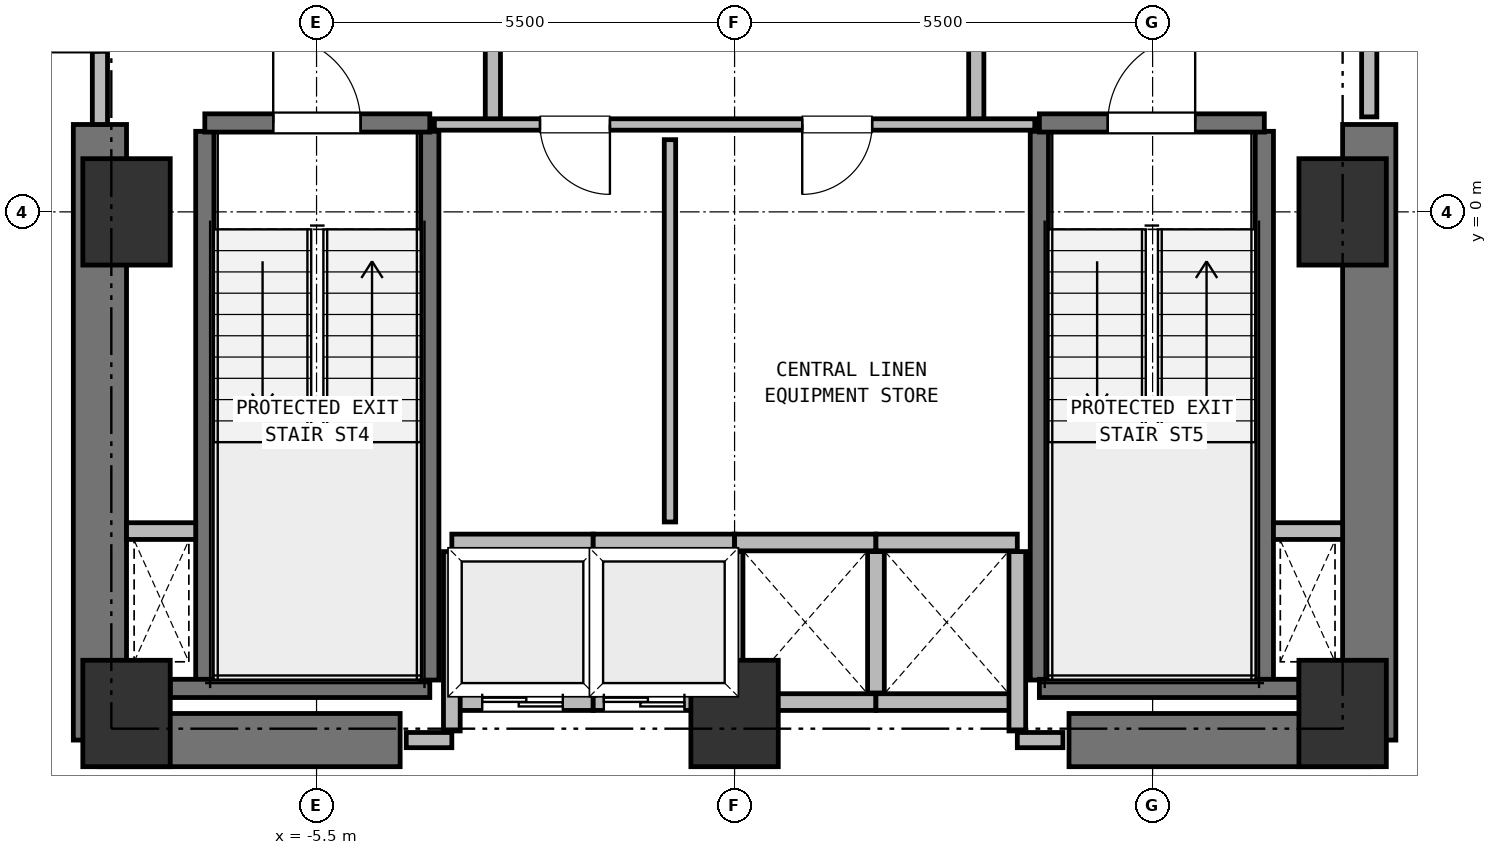
"""IFC4 building model, lengths in metres.
Left out: names, types, materials, properties, quantities, classifications, styles, units other than length and angle.
Written with IfcOpenShell. Run it as: python <this file> out.ifc"""

import sys

from ifc_helpers import new_model, si_unit, direction, frame, frame_2d, origin, origin_2d, place, context, subcontext, project, spatial, rectangle, extrude, element, fill, save


model = new_model("IFC4")
c1 = context("Model", 3, precision=1e-05, world=origin(), true_north=direction((0.0, 1.0)))
c2 = subcontext(c1, "Body", "Model", "MODEL_VIEW")
j1 = project(units=[si_unit("LENGTHUNIT", "METRE"), si_unit("PLANEANGLEUNIT", "RADIAN")], contexts=[c1])
p1 = place(None, origin())
s1 = spatial("IfcSite", under=j1, at=p1, CompositionType="ELEMENT")
p2 = place(p1, origin())
s2 = spatial("IfcBuilding", under=s1, at=p2, CompositionType="ELEMENT")
p3 = place(p2, frame((0.0, 0.0, 30.5)))
s3 = spatial("IfcBuildingStorey", under=s2, at=p3, CompositionType="ELEMENT", Elevation=30.5)
for number, where, z_axis, x_axis in (
    (1, (-8.0, -6.6, 0.0), (0.0, 0.0, 1.0), (1.0, 0.0, 0.0)),
    (2, (0.0, -6.6, 0.0), (0.0, 0.0, 1.0), (1.0, 0.0, 0.0)),
    (3, (8.0, -6.6, 0.0), (0.0, 0.0, 1.0), (1.0, 0.0, 0.0)),
    (4, (8.0, 0.0, 0.0), (0.0, 0.0, 1.0), (1.0, 0.0, 0.0)),
    (5, (-8.0, 0.0, 0.0), (0.0, 0.0, 1.0), (1.0, 0.0, 0.0)),
):
    element("IfcColumn", number, at=place(p3, frame(where, z_axis=z_axis, x_axis=x_axis)), inside=s3, PredefinedType="COLUMN", context=c2, shape_type="SweptSolid", body=[
        extrude(rectangle(XDim=1.15, YDim=1.4, at=origin_2d()), origin(), (0.0, 0.0, 1.0), 3.75),
    ])
for number, where, z_axis, x_axis in (
    (6, (-8.35, -6.95, 0.0), (0.0, 0.0, 1.0), (1.0, 0.0, 0.0)),
    (7, (4.4, -6.95, 0.0), (0.0, 0.0, 1.0), (1.0, 0.0, 0.0)),
):
    element("IfcWall", number, at=place(p3, frame(where, z_axis=z_axis, x_axis=x_axis)), inside=s3, PredefinedType="SHEAR", context=c2, shape_type="SweptSolid", body=[
        extrude(rectangle(XDim=3.95, YDim=0.7, at=frame_2d((1.975, 0.0))), origin(), (0.0, 0.0, 1.0), 3.5),
    ])
for number, where, z_axis, x_axis in (
    (8, (-8.35, -6.95, 0.0), (0.0, 0.0, 1.0), (0.0, 1.0, 0.0)),
    (9, (8.35, -6.95, 0.0), (0.0, 0.0, 1.0), (0.0, 1.0, 0.0)),
):
    element("IfcWall", number, at=place(p3, frame(where, z_axis=z_axis, x_axis=x_axis)), inside=s3, PredefinedType="SHEAR", context=c2, shape_type="SweptSolid", body=[
        extrude(rectangle(XDim=8.1, YDim=0.7, at=frame_2d((4.05, 0.0))), origin(), (0.0, 0.0, 1.0), 3.5),
    ])
p4 = place(p3, frame((-6.97, -6.16, 0.0), z_axis=(0.0, 0.0, 1.0), x_axis=(0.0, 1.0, 0.0)))
e10 = element("IfcWall", 10, at=p4, inside=s3, PredefinedType="SHEAR", context=c2, shape_type="SweptSolid", body=[
    extrude(rectangle(XDim=7.22, YDim=0.24, at=frame_2d((3.61, 0.0))), origin(), (0.0, 0.0, 1.0), 3.5),
])
p5 = place(p3, frame((-7.425, -6.27, 0.0), z_axis=(0.0, 0.0, 1.0), x_axis=(1.0, 0.0, 0.0)))
e11 = element("IfcWall", 11, at=p5, inside=s3, PredefinedType="SHEAR", context=c2, shape_type="SweptSolid", body=[
    extrude(rectangle(XDim=3.415, YDim=0.24, at=frame_2d((1.708, 0.0))), origin(), (0.0, 0.0, 1.0), 3.5),
])
p6 = place(p3, frame((-4.01, -6.16, 0.0), z_axis=(0.0, 0.0, 1.0), x_axis=(0.0, 1.0, 0.0)))
e12 = element("IfcWall", 12, at=p6, inside=s3, PredefinedType="SHEAR", context=c2, shape_type="SweptSolid", body=[
    extrude(rectangle(XDim=7.22, YDim=0.24, at=frame_2d((3.61, 0.0))), origin(), (0.0, 0.0, 1.0), 3.5),
])
p7 = place(p3, frame((-6.97, 1.17, 0.0), z_axis=(0.0, 0.0, 1.0), x_axis=(1.0, 0.0, 0.0)))
e13 = element("IfcWall", 13, at=p7, inside=s3, PredefinedType="SHEAR", context=c2, shape_type="SweptSolid", body=[
    extrude(rectangle(XDim=2.96, YDim=0.24, at=frame_2d((1.48, 0.0))), origin(), (0.0, 0.0, 1.0), 3.5),
])
p8 = place(p7, frame((0.9, 0.0, 0.0)))
e14 = element("IfcOpeningElement", 14, at=p8, cuts=e13, PredefinedType="OPENING", context=c2, shape_type="SweptSolid", body=[
    extrude(rectangle(XDim=1.15, YDim=2.15, at=frame_2d((0.575, 1.075))), frame((0.0, 0.13, 0.0), z_axis=(0.0, -1.0, 0.0), x_axis=(1.0, 0.0, 0.0)), (0.0, 0.0, 1.0), 0.26),
])
for number, where, z_axis, x_axis in (
    (15, (4.01, -6.16, 0.0), (0.0, 0.0, 1.0), (0.0, 1.0, 0.0)),
    (16, (6.97, -6.16, 0.0), (0.0, 0.0, 1.0), (0.0, 1.0, 0.0)),
):
    element("IfcWall", number, at=place(p3, frame(where, z_axis=z_axis, x_axis=x_axis)), inside=s3, PredefinedType="SHEAR", context=c2, shape_type="SweptSolid", body=[
        extrude(rectangle(XDim=7.22, YDim=0.24, at=frame_2d((3.61, 0.0))), origin(), (0.0, 0.0, 1.0), 3.5),
    ])
p9 = place(p3, frame((4.01, -6.27, 0.0), z_axis=(0.0, 0.0, 1.0), x_axis=(1.0, 0.0, 0.0)))
e17 = element("IfcWall", 17, at=p9, inside=s3, PredefinedType="SHEAR", context=c2, shape_type="SweptSolid", body=[
    extrude(rectangle(XDim=3.415, YDim=0.24, at=frame_2d((1.708, 0.0))), origin(), (0.0, 0.0, 1.0), 3.5),
])
p10 = place(p3, frame((4.01, 1.17, 0.0), z_axis=(0.0, 0.0, 1.0), x_axis=(1.0, 0.0, 0.0)))
e18 = element("IfcWall", 18, at=p10, inside=s3, PredefinedType="SHEAR", context=c2, shape_type="SweptSolid", body=[
    extrude(rectangle(XDim=2.96, YDim=0.24, at=frame_2d((1.48, 0.0))), origin(), (0.0, 0.0, 1.0), 3.5),
])
p11 = place(p10, frame((0.9, 0.0, 0.0)))
e19 = element("IfcOpeningElement", 19, at=p11, cuts=e18, PredefinedType="OPENING", context=c2, shape_type="SweptSolid", body=[
    extrude(rectangle(XDim=1.15, YDim=2.15, at=frame_2d((0.575, 1.075))), frame((0.0, 0.13, 0.0), z_axis=(0.0, -1.0, 0.0), x_axis=(1.0, 0.0, 0.0)), (0.0, 0.0, 1.0), 0.26),
])
for number, where, z_axis, x_axis in (
    (20, (-8.0, -4.2, 0.0), (0.0, 0.0, 1.0), (1.0, 0.0, 0.0)),
    (21, (7.09, -4.2, 0.0), (0.0, 0.0, 1.0), (1.0, 0.0, 0.0)),
):
    element("IfcWall", number, at=place(p3, frame(where, z_axis=z_axis, x_axis=x_axis)), inside=s3, PredefinedType="PARTITIONING", context=c2, shape_type="SweptSolid", body=[
        extrude(rectangle(XDim=0.91, YDim=0.22, at=frame_2d((0.455, 0.0))), origin(), (0.0, 0.0, 1.0), 3.5),
    ])
p12 = place(p3, frame((-3.72, -6.45, 0.0), z_axis=(0.0, 0.0, 1.0), x_axis=(1.0, 0.0, 0.0)))
e22 = element("IfcWall", 22, at=p12, inside=s3, PredefinedType="PARTITIONING", context=c2, shape_type="SweptSolid", body=[
    extrude(rectangle(XDim=1.86, YDim=0.22, at=frame_2d((0.93, 0.0))), origin(), (0.0, 0.0, 1.0), 3.08),
])
p13 = place(p12, frame((0.4, 0.0, 0.0)))
e23 = element("IfcOpeningElement", 23, at=p13, cuts=e22, PredefinedType="OPENING", context=c2, shape_type="SweptSolid", body=[
    extrude(rectangle(XDim=1.06, YDim=2.15, at=frame_2d((0.53, 1.075))), frame((0.0, 0.12, 0.0), z_axis=(0.0, -1.0, 0.0), x_axis=(1.0, 0.0, 0.0)), (0.0, 0.0, 1.0), 0.24),
])
p14 = place(p3, frame((-3.72, -4.35, 0.0), z_axis=(0.0, 0.0, 1.0), x_axis=(1.0, 0.0, 0.0)))
e24 = element("IfcWall", 24, at=p14, inside=s3, PredefinedType="PARTITIONING", context=c2, shape_type="SweptSolid", body=[
    extrude(rectangle(XDim=1.86, YDim=0.22, at=frame_2d((0.93, 0.0))), origin(), (0.0, 0.0, 1.0), 3.5),
])
p15 = place(p3, frame((-3.72, -6.83, 0.0), z_axis=(0.0, 0.0, 1.0), x_axis=(0.0, 1.0, 0.0)))
e25 = element("IfcWall", 25, at=p15, inside=s3, PredefinedType="PARTITIONING", context=c2, shape_type="SweptSolid", body=[
    extrude(rectangle(XDim=2.36, YDim=0.22, at=frame_2d((1.18, 0.0))), origin(), (0.0, 0.0, 1.0), 3.5),
])
p16 = place(p3, frame((-1.86, -6.33, 0.0), z_axis=(0.0, 0.0, 1.0), x_axis=(0.0, 1.0, 0.0)))
e26 = element("IfcWall", 26, at=p16, inside=s3, PredefinedType="PARTITIONING", context=c2, shape_type="SweptSolid", body=[
    extrude(rectangle(XDim=1.86, YDim=0.22, at=frame_2d((0.93, 0.0))), origin(), (0.0, 0.0, 1.0), 3.5),
])
p17 = place(p3, frame((-1.86, -6.45, 0.0), z_axis=(0.0, 0.0, 1.0), x_axis=(1.0, 0.0, 0.0)))
e27 = element("IfcWall", 27, at=p17, inside=s3, PredefinedType="PARTITIONING", context=c2, shape_type="SweptSolid", body=[
    extrude(rectangle(XDim=1.86, YDim=0.22, at=frame_2d((0.93, 0.0))), origin(), (0.0, 0.0, 1.0), 3.08),
])
p18 = place(p17, frame((0.14, 0.0, 0.0)))
e28 = element("IfcOpeningElement", 28, at=p18, cuts=e27, PredefinedType="OPENING", context=c2, shape_type="SweptSolid", body=[
    extrude(rectangle(XDim=1.06, YDim=2.15, at=frame_2d((0.53, 1.075))), frame((0.0, 0.12, 0.0), z_axis=(0.0, -1.0, 0.0), x_axis=(1.0, 0.0, 0.0)), (0.0, 0.0, 1.0), 0.24),
])
for number, where, z_axis, x_axis in (
    (29, (-1.86, -4.35, 0.0), (0.0, 0.0, 1.0), (1.0, 0.0, 0.0)),
    (30, (0.0, -6.33, 0.0), (0.0, 0.0, 1.0), (0.0, 1.0, 0.0)),
):
    element("IfcWall", number, at=place(p3, frame(where, z_axis=z_axis, x_axis=x_axis)), inside=s3, PredefinedType="PARTITIONING", context=c2, shape_type="SweptSolid", body=[
        extrude(rectangle(XDim=1.86, YDim=0.22, at=frame_2d((0.93, 0.0))), origin(), (0.0, 0.0, 1.0), 3.5),
    ])
p19 = place(p3, frame((0.0, -6.45, 0.0), z_axis=(0.0, 0.0, 1.0), x_axis=(1.0, 0.0, 0.0)))
e31 = element("IfcWall", 31, at=p19, inside=s3, PredefinedType="PARTITIONING", context=c2, shape_type="SweptSolid", body=[
    extrude(rectangle(XDim=1.86, YDim=0.22, at=frame_2d((0.93, 0.0))), origin(), (0.0, 0.0, 1.0), 3.08),
])
for number, where, z_axis, x_axis in (
    (32, (0.0, -4.35, 0.0), (0.0, 0.0, 1.0), (1.0, 0.0, 0.0)),
    (33, (1.86, -6.33, 0.0), (0.0, 0.0, 1.0), (0.0, 1.0, 0.0)),
):
    element("IfcWall", number, at=place(p3, frame(where, z_axis=z_axis, x_axis=x_axis)), inside=s3, PredefinedType="PARTITIONING", context=c2, shape_type="SweptSolid", body=[
        extrude(rectangle(XDim=1.86, YDim=0.22, at=frame_2d((0.93, 0.0))), origin(), (0.0, 0.0, 1.0), 3.5),
    ])
p20 = place(p3, frame((1.86, -6.45, 0.0), z_axis=(0.0, 0.0, 1.0), x_axis=(1.0, 0.0, 0.0)))
e34 = element("IfcWall", 34, at=p20, inside=s3, PredefinedType="PARTITIONING", context=c2, shape_type="SweptSolid", body=[
    extrude(rectangle(XDim=1.86, YDim=0.22, at=frame_2d((0.93, 0.0))), origin(), (0.0, 0.0, 1.0), 3.08),
])
p21 = place(p3, frame((1.86, -4.35, 0.0), z_axis=(0.0, 0.0, 1.0), x_axis=(1.0, 0.0, 0.0)))
e35 = element("IfcWall", 35, at=p21, inside=s3, PredefinedType="PARTITIONING", context=c2, shape_type="SweptSolid", body=[
    extrude(rectangle(XDim=1.86, YDim=0.22, at=frame_2d((0.93, 0.0))), origin(), (0.0, 0.0, 1.0), 3.5),
])
p22 = place(p3, frame((3.72, -6.83, 0.0), z_axis=(0.0, 0.0, 1.0), x_axis=(0.0, 1.0, 0.0)))
e36 = element("IfcWall", 36, at=p22, inside=s3, PredefinedType="PARTITIONING", context=c2, shape_type="SweptSolid", body=[
    extrude(rectangle(XDim=2.36, YDim=0.22, at=frame_2d((1.18, 0.0))), origin(), (0.0, 0.0, 1.0), 3.5),
])
p23 = place(p3, frame((-3.18, 1.15, 0.0), z_axis=(0.0, 0.0, 1.0), x_axis=(0.0, 1.0, 0.0)))
e37 = element("IfcWall", 37, at=p23, inside=s3, PredefinedType="PARTITIONING", context=c2, shape_type="SweptSolid", body=[
    extrude(rectangle(XDim=3.3, YDim=0.2, at=frame_2d((1.65, 0.0))), origin(), (0.0, 0.0, 1.0), 3.5),
])
p24 = place(p23, frame((1.08, 0.0, 0.0)))
e38 = element("IfcOpeningElement", 38, at=p24, cuts=e37, PredefinedType="OPENING", context=c2, shape_type="SweptSolid", body=[
    extrude(rectangle(XDim=1.15, YDim=2.15, at=frame_2d((0.575, 1.075))), frame((0.0, 0.11, 0.0), z_axis=(0.0, -1.0, 0.0), x_axis=(1.0, 0.0, 0.0)), (0.0, 0.0, 1.0), 0.22),
])
p25 = place(p3, frame((3.18, 1.15, 0.0), z_axis=(0.0, 0.0, 1.0), x_axis=(0.0, 1.0, 0.0)))
e39 = element("IfcWall", 39, at=p25, inside=s3, PredefinedType="PARTITIONING", context=c2, shape_type="SweptSolid", body=[
    extrude(rectangle(XDim=3.3, YDim=0.2, at=frame_2d((1.65, 0.0))), origin(), (0.0, 0.0, 1.0), 3.5),
])
p26 = place(p25, frame((1.08, 0.0, 0.0)))
e40 = element("IfcOpeningElement", 40, at=p26, cuts=e39, PredefinedType="OPENING", context=c2, shape_type="SweptSolid", body=[
    extrude(rectangle(XDim=1.15, YDim=2.15, at=frame_2d((0.575, 1.075))), frame((0.0, 0.11, 0.0), z_axis=(0.0, -1.0, 0.0), x_axis=(1.0, 0.0, 0.0)), (0.0, 0.0, 1.0), 0.22),
])
p27 = place(p3, frame((-8.35, 1.15, 0.0), z_axis=(0.0, 0.0, 1.0), x_axis=(0.0, 1.0, 0.0)))
e41 = element("IfcWall", 41, at=p27, inside=s3, PredefinedType="PARTITIONING", context=c2, shape_type="SweptSolid", body=[
    extrude(rectangle(XDim=5.4, YDim=0.2, at=frame_2d((2.7, 0.0))), origin(), (0.0, 0.0, 1.0), 3.5),
])
p28 = place(p27, frame((0.95, 0.0, 0.0)))
e42 = element("IfcOpeningElement", 42, at=p28, cuts=e41, PredefinedType="OPENING", context=c2, shape_type="SweptSolid", body=[
    extrude(rectangle(XDim=1.15, YDim=2.15, at=frame_2d((0.575, 1.075))), frame((0.0, 0.11, 0.0), z_axis=(0.0, -1.0, 0.0), x_axis=(1.0, 0.0, 0.0)), (0.0, 0.0, 1.0), 0.22),
])
p29 = place(p3, frame((8.35, 1.25, 0.0), z_axis=(0.0, 0.0, 1.0), x_axis=(0.0, 1.0, 0.0)))
e43 = element("IfcWall", 43, at=p29, inside=s3, PredefinedType="PARTITIONING", context=c2, shape_type="SweptSolid", body=[
    extrude(rectangle(XDim=5.3, YDim=0.2, at=frame_2d((2.65, 0.0))), origin(), (0.0, 0.0, 1.0), 3.5),
])
p30 = place(p29, frame((0.95, 0.0, 0.0)))
e44 = element("IfcOpeningElement", 44, at=p30, cuts=e43, PredefinedType="OPENING", context=c2, shape_type="SweptSolid", body=[
    extrude(rectangle(XDim=1.15, YDim=2.15, at=frame_2d((0.575, 1.075))), frame((0.0, 0.11, 0.0), z_axis=(0.0, -1.0, 0.0), x_axis=(1.0, 0.0, 0.0)), (0.0, 0.0, 1.0), 0.22),
])
p31 = place(p3, frame((3.95, 1.15, 0.0), z_axis=(0.0, 0.0, 1.0), x_axis=(-1.0, 0.0, 0.0)))
e45 = element("IfcWall", 45, at=p31, inside=s3, PredefinedType="PARTITIONING", context=c2, shape_type="SweptSolid", body=[
    extrude(rectangle(XDim=7.9, YDim=0.15, at=frame_2d((3.95, 0.0))), origin(), (0.0, 0.0, 1.0), 3.5),
])
p32 = place(p31, frame((5.59, 0.0, 0.0)))
e46 = element("IfcOpeningElement", 46, at=p32, cuts=e45, PredefinedType="OPENING", context=c2, shape_type="SweptSolid", body=[
    extrude(rectangle(XDim=0.92, YDim=2.05, at=frame_2d((0.46, 1.025))), frame((0.0, 0.085, 0.0), z_axis=(0.0, -1.0, 0.0), x_axis=(1.0, 0.0, 0.0)), (0.0, 0.0, 1.0), 0.17),
])
p33 = place(p31, frame((2.14, 0.0, 0.0)))
e47 = element("IfcOpeningElement", 47, at=p33, cuts=e45, PredefinedType="OPENING", context=c2, shape_type="SweptSolid", body=[
    extrude(rectangle(XDim=0.92, YDim=2.05, at=frame_2d((0.46, 1.025))), frame((0.0, 0.085, 0.0), z_axis=(0.0, -1.0, 0.0), x_axis=(1.0, 0.0, 0.0)), (0.0, 0.0, 1.0), 0.17),
])
for number, where, z_axis, x_axis in (
    (48, (-4.32, -6.95, 0.0), (0.0, 0.0, 1.0), (1.0, 0.0, 0.0)),
    (49, (3.72, -6.95, 0.0), (0.0, 0.0, 1.0), (1.0, 0.0, 0.0)),
):
    element("IfcWall", number, at=place(p3, frame(where, z_axis=z_axis, x_axis=x_axis)), inside=s3, PredefinedType="PARTITIONING", context=c2, shape_type="SweptSolid", body=[
        extrude(rectangle(XDim=0.6, YDim=0.2, at=frame_2d((0.3, 0.0))), origin(), (0.0, 0.0, 1.0), 3.5),
    ])
p34 = place(p3, frame((-0.85, -4.08, 0.0), z_axis=(0.0, 0.0, 1.0), x_axis=(0.0, 1.0, 0.0)))
e50 = element("IfcWall", 50, at=p34, inside=s3, PredefinedType="PARTITIONING", context=c2, shape_type="SweptSolid", body=[
    extrude(rectangle(XDim=5.03, YDim=0.15, at=frame_2d((2.515, 0.0))), origin(), (0.0, 0.0, 1.0), 3.5),
])
p35 = place(p3, frame((10.752, -7.178, 0.0), z_axis=(0.0, 0.0, 1.0), x_axis=(-0.707067066127, -0.707146494016, 0.0)))
e51 = element("IfcWall", 51, at=p35, inside=s3, PredefinedType="PARTITIONING", context=c2, shape_type="SweptSolid", body=[
    extrude(rectangle(XDim=3.074, YDim=0.15, at=frame_2d((1.537, 0.0))), origin(), (0.0, 0.0, 1.0), 3.12),
])
p36 = place(p3, frame((-8.578, -9.352, 0.0), z_axis=(0.0, 0.0, 1.0), x_axis=(-0.707067066127, 0.707146494016, 0.0)))
e52 = element("IfcWall", 52, at=p36, inside=s3, PredefinedType="PARTITIONING", context=c2, shape_type="SweptSolid", body=[
    extrude(rectangle(XDim=3.074, YDim=0.15, at=frame_2d((1.537, 0.0))), origin(), (0.0, 0.0, 1.0), 3.5),
])
p37 = place(p36, frame((0.754, 0.0, 0.0)))
e53 = element("IfcOpeningElement", 53, at=p37, cuts=e52, PredefinedType="OPENING", context=c2, shape_type="SweptSolid", body=[
    extrude(rectangle(XDim=1.06, YDim=2.15, at=frame_2d((0.53, 1.075))), frame((0.0, 0.085, 0.0), z_axis=(0.0, -1.0, 0.0), x_axis=(1.0, 0.0, 0.0)), (0.0, 0.0, 1.0), 0.17),
])
p38 = place(p8, origin())
e54 = element("IfcDoor", 54, at=p38, inside=s3, OperationType="SINGLE_SWING_LEFT", PredefinedType="DOOR", context=c2, shape_type="SweptSolid", body=[
    extrude(rectangle(XDim=1.15, YDim=2.15, at=frame_2d((0.575, 1.075))), frame((0.0, 0.025, 0.0), z_axis=(0.0, -1.0, 0.0), x_axis=(1.0, 0.0, 0.0)), (0.0, 0.0, 1.0), 0.05),
])
fill(e14, e54)
p39 = place(p11, origin())
e55 = element("IfcDoor", 55, at=p39, inside=s3, OperationType="SINGLE_SWING_RIGHT", PredefinedType="DOOR", context=c2, shape_type="SweptSolid", body=[
    extrude(rectangle(XDim=1.15, YDim=2.15, at=frame_2d((0.575, 1.075))), frame((0.0, 0.025, 0.0), z_axis=(0.0, -1.0, 0.0), x_axis=(1.0, 0.0, 0.0)), (0.0, 0.0, 1.0), 0.05),
])
fill(e19, e55)
p40 = place(p13, origin())
e56 = element("IfcDoor", 56, at=p40, inside=s3, OperationType="DOUBLE_DOOR_SLIDING", PredefinedType="DOOR", context=c2, shape_type="SweptSolid", body=[
    extrude(rectangle(XDim=1.06, YDim=2.15, at=frame_2d((0.53, 1.075))), frame((0.0, 0.025, 0.0), z_axis=(0.0, -1.0, 0.0), x_axis=(1.0, 0.0, 0.0)), (0.0, 0.0, 1.0), 0.05),
])
fill(e23, e56)
p41 = place(p18, origin())
e57 = element("IfcDoor", 57, at=p41, inside=s3, OperationType="DOUBLE_DOOR_SLIDING", PredefinedType="DOOR", context=c2, shape_type="SweptSolid", body=[
    extrude(rectangle(XDim=1.06, YDim=2.15, at=frame_2d((0.53, 1.075))), frame((0.0, 0.025, 0.0), z_axis=(0.0, -1.0, 0.0), x_axis=(1.0, 0.0, 0.0)), (0.0, 0.0, 1.0), 0.05),
])
fill(e28, e57)
p42 = place(p28, origin())
e58 = element("IfcDoor", 58, at=p42, inside=s3, OperationType="SINGLE_SWING_LEFT", PredefinedType="DOOR", context=c2, shape_type="SweptSolid", body=[
    extrude(rectangle(XDim=1.15, YDim=2.15, at=frame_2d((0.575, 1.075))), frame((0.0, 0.025, 0.0), z_axis=(0.0, -1.0, 0.0), x_axis=(1.0, 0.0, 0.0)), (0.0, 0.0, 1.0), 0.05),
])
fill(e42, e58)
p43 = place(p32, origin())
e59 = element("IfcDoor", 59, at=p43, inside=s3, OperationType="SINGLE_SWING_LEFT", PredefinedType="DOOR", context=c2, shape_type="SweptSolid", body=[
    extrude(rectangle(XDim=0.92, YDim=2.05, at=frame_2d((0.46, 1.025))), frame((0.0, 0.025, 0.0), z_axis=(0.0, -1.0, 0.0), x_axis=(1.0, 0.0, 0.0)), (0.0, 0.0, 1.0), 0.05),
])
fill(e46, e59)
p44 = place(p33, origin())
e60 = element("IfcDoor", 60, at=p44, inside=s3, OperationType="SINGLE_SWING_RIGHT", PredefinedType="DOOR", context=c2, shape_type="SweptSolid", body=[
    extrude(rectangle(XDim=0.92, YDim=2.05, at=frame_2d((0.46, 1.025))), frame((0.0, 0.025, 0.0), z_axis=(0.0, -1.0, 0.0), x_axis=(1.0, 0.0, 0.0)), (0.0, 0.0, 1.0), 0.05),
])
fill(e47, e60)
save(model, sys.argv[1])
